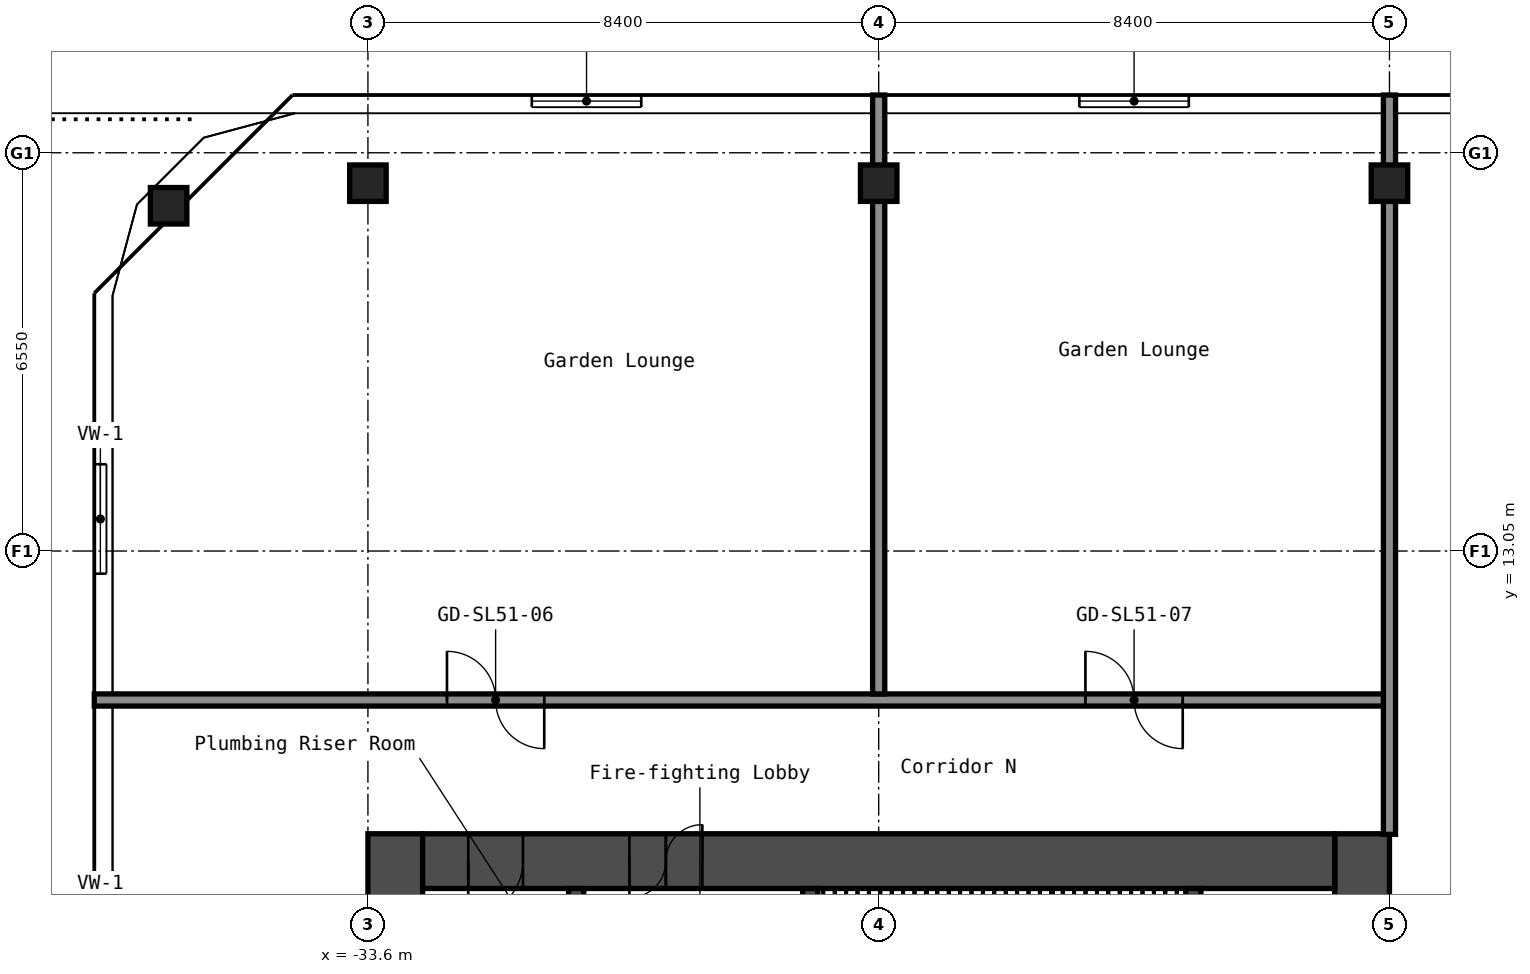
"""IFC4 building model, lengths in metres.
Left out: names, types, materials, properties, quantities, classifications, styles, units other than length and angle.
Written with IfcOpenShell. Run it as: python <this file> out.ifc"""

import sys

from ifc_helpers import new_model, si_unit, direction, frame, frame_2d, origin, origin_2d, place, context, subcontext, project, spatial, rectangle, hollow_rectangle, extrude, element, fill, save


model = new_model("IFC4")
c1 = context("Model", 3, precision=1e-05, world=origin(), true_north=direction((0.0, 1.0)))
c2 = subcontext(c1, "Body", "Model", "MODEL_VIEW")
j1 = project(units=[si_unit("LENGTHUNIT", "METRE"), si_unit("PLANEANGLEUNIT", "RADIAN")], contexts=[c1])
p1 = place(None, origin())
s1 = spatial("IfcSite", under=j1, at=p1, CompositionType="ELEMENT")
p2 = place(p1, origin())
s2 = spatial("IfcBuilding", under=s1, at=p2, CompositionType="ELEMENT")
p3 = place(p2, frame((0.0, 0.0, 180.2)))
s3 = spatial("IfcBuildingStorey", under=s2, at=p3, CompositionType="ELEMENT", Elevation=180.2)
for number, where, z_axis, x_axis in (
    (1, (-36.878, 18.729, 0.0), (0.0, 0.0, 1.0), (1.0, 0.0, 0.0)),
    (2, (-33.6, 19.1, 0.0), (0.0, 0.0, 1.0), (1.0, 0.0, 0.0)),
    (3, (-25.2, 19.1, 0.0), (0.0, 0.0, 1.0), (1.0, 0.0, 0.0)),
    (4, (-16.8, 19.1, 0.0), (0.0, 0.0, 1.0), (1.0, 0.0, 0.0)),
):
    element("IfcColumn", number, at=place(p3, frame(where, z_axis=z_axis, x_axis=x_axis)), inside=s3, PredefinedType="COLUMN", context=c2, shape_type="SweptSolid", body=[
        extrude(hollow_rectangle(XDim=0.6, YDim=0.6, WallThickness=0.025, InnerFilletRadius=0.038, OuterFilletRadius=0.062, at=origin_2d()), origin(), (0.0, 0.0, 1.0), 5.95),
    ])
p4 = place(p3, frame((-17.25, -8.4, 0.0), z_axis=(0.0, 0.0, 1.0), x_axis=(0.0, 1.0, 0.0)))
e5 = element("IfcWall", 5, at=p4, inside=s3, PredefinedType="SHEAR", context=c2, shape_type="SweptSolid", body=[
    extrude(rectangle(XDim=16.8, YDim=0.9, at=frame_2d((8.4, 0.0))), origin(), (0.0, 0.0, 1.0), 5.95),
])
p5 = place(p4, frame((10.1, 0.0, 0.0)))
e6 = element("IfcOpeningElement", 6, at=p5, cuts=e5, PredefinedType="OPENING", context=c2, shape_type="SweptSolid", body=[
    extrude(rectangle(XDim=1.6, YDim=2.1, at=frame_2d((0.8, 1.05))), frame((0.0, 0.46, 0.0), z_axis=(0.0, -1.0, 0.0), x_axis=(1.0, 0.0, 0.0)), (0.0, 0.0, 1.0), 0.92),
])
p6 = place(p3, frame((-33.15, -8.4, 0.0), z_axis=(0.0, 0.0, 1.0), x_axis=(0.0, 1.0, 0.0)))
e7 = element("IfcWall", 7, at=p6, inside=s3, PredefinedType="SHEAR", context=c2, shape_type="SweptSolid", body=[
    extrude(rectangle(XDim=16.8, YDim=0.9, at=frame_2d((8.4, 0.0))), origin(), (0.0, 0.0, 1.0), 5.95),
])
p7 = place(p3, frame((-32.7, 7.95, 0.0), z_axis=(0.0, 0.0, 1.0), x_axis=(1.0, 0.0, 0.0)))
e8 = element("IfcWall", 8, at=p7, inside=s3, PredefinedType="SHEAR", context=c2, shape_type="SweptSolid", body=[
    extrude(rectangle(XDim=15.0, YDim=0.9, at=frame_2d((7.5, 0.0))), origin(), (0.0, 0.0, 1.0), 5.95),
])
p8 = place(p7, frame((3.4, 0.0, 0.0)))
e9 = element("IfcOpeningElement", 9, at=p8, cuts=e8, PredefinedType="OPENING", context=c2, shape_type="SweptSolid", body=[
    extrude(rectangle(XDim=1.2, YDim=2.1, at=frame_2d((0.6, 1.05))), frame((0.0, 0.46, 0.0), z_axis=(0.0, -1.0, 0.0), x_axis=(1.0, 0.0, 0.0)), (0.0, 0.0, 1.0), 0.92),
])
p9 = place(p7, frame((0.75, 0.0, 0.0)))
e10 = element("IfcOpeningElement", 10, at=p9, cuts=e8, PredefinedType="OPENING", context=c2, shape_type="SweptSolid", body=[
    extrude(rectangle(XDim=0.9, YDim=2.1, at=frame_2d((0.45, 1.05))), frame((0.0, 0.46, 0.0), z_axis=(0.0, -1.0, 0.0), x_axis=(1.0, 0.0, 0.0)), (0.0, 0.0, 1.0), 0.92),
])
p10 = place(p3, frame((-20.025, 1.2, 0.0), z_axis=(0.0, 0.0, 1.0), x_axis=(0.0, 1.0, 0.0)))
e11 = element("IfcWall", 11, at=p10, inside=s3, PredefinedType="SHEAR", context=c2, shape_type="SweptSolid", body=[
    extrude(rectangle(XDim=6.3, YDim=0.25, at=frame_2d((3.15, 0.0))), origin(), (0.0, 0.0, 1.0), 5.95),
])
p11 = place(p3, frame((-26.325, 3.75, 0.0), z_axis=(0.0, 0.0, 1.0), x_axis=(0.0, 1.0, 0.0)))
e12 = element("IfcWall", 12, at=p11, inside=s3, PredefinedType="SHEAR", context=c2, shape_type="SweptSolid", body=[
    extrude(rectangle(XDim=3.75, YDim=0.25, at=frame_2d((1.875, 0.0))), origin(), (0.0, 0.0, 1.0), 5.95),
])
p12 = place(p11, frame((1.25, 0.0, 0.0)))
e13 = element("IfcOpeningElement", 13, at=p12, cuts=e12, PredefinedType="OPENING", context=c2, shape_type="SweptSolid", body=[
    extrude(rectangle(XDim=1.2, YDim=2.1, at=frame_2d((0.6, 1.05))), frame((0.0, 0.135, 0.0), z_axis=(0.0, -1.0, 0.0), x_axis=(1.0, 0.0, 0.0)), (0.0, 0.0, 1.0), 0.27),
])
p13 = place(p3, frame((-30.175, 1.45, 0.0), z_axis=(0.0, 0.0, 1.0), x_axis=(0.0, 1.0, 0.0)))
e14 = element("IfcWall", 14, at=p13, inside=s3, PredefinedType="SHEAR", context=c2, shape_type="SweptSolid", body=[
    extrude(rectangle(XDim=6.05, YDim=0.25, at=frame_2d((3.025, 0.0))), origin(), (0.0, 0.0, 1.0), 5.95),
])
p14 = place(p13, frame((2.625, 0.0, 0.0)))
e15 = element("IfcOpeningElement", 15, at=p14, cuts=e14, PredefinedType="OPENING", context=c2, shape_type="SweptSolid", body=[
    extrude(rectangle(XDim=1.1, YDim=2.1, at=frame_2d((0.55, 1.05))), frame((0.0, 0.135, 0.0), z_axis=(0.0, -1.0, 0.0), x_axis=(1.0, 0.0, 0.0)), (0.0, 0.0, 1.0), 0.27),
])
p15 = place(p3, frame((-38.1, 10.6, 0.0), z_axis=(0.0, 0.0, 1.0), x_axis=(1.0, 0.0, 0.0)))
e16 = element("IfcWall", 16, at=p15, inside=s3, PredefinedType="PARTITIONING", context=c2, shape_type="SweptSolid", body=[
    extrude(rectangle(XDim=21.3, YDim=0.2, at=frame_2d((10.65, 0.0))), origin(), (0.0, 0.0, 1.0), 5.95),
])
p16 = place(p15, frame((5.8, 0.0, 0.0)))
e17 = element("IfcOpeningElement", 17, at=p16, cuts=e16, PredefinedType="OPENING", context=c2, shape_type="SweptSolid", body=[
    extrude(rectangle(XDim=1.6, YDim=2.1, at=frame_2d((0.8, 1.05))), frame((0.0, 0.11, 0.0), z_axis=(0.0, -1.0, 0.0), x_axis=(1.0, 0.0, 0.0)), (0.0, 0.0, 1.0), 0.22),
])
p17 = place(p15, frame((16.3, 0.0, 0.0)))
e18 = element("IfcOpeningElement", 18, at=p17, cuts=e16, PredefinedType="OPENING", context=c2, shape_type="SweptSolid", body=[
    extrude(rectangle(XDim=1.6, YDim=2.1, at=frame_2d((0.8, 1.05))), frame((0.0, 0.11, 0.0), z_axis=(0.0, -1.0, 0.0), x_axis=(1.0, 0.0, 0.0)), (0.0, 0.0, 1.0), 0.22),
])
p18 = place(p3, frame((-25.2, 10.7, 0.0), z_axis=(0.0, 0.0, 1.0), x_axis=(0.0, 1.0, 0.0)))
e19 = element("IfcWall", 19, at=p18, inside=s3, PredefinedType="PARTITIONING", context=c2, shape_type="SweptSolid", body=[
    extrude(rectangle(XDim=9.85, YDim=0.2, at=frame_2d((4.925, 0.0))), origin(), (0.0, 0.0, 1.0), 5.95),
])
p19 = place(p3, frame((-16.8, 8.39, 0.0), z_axis=(0.0, 0.0, 1.0), x_axis=(0.0, 1.0, 0.0)))
e20 = element("IfcWall", 20, at=p19, inside=s3, PredefinedType="PARTITIONING", context=c2, shape_type="SweptSolid", body=[
    extrude(rectangle(XDim=12.16, YDim=0.2, at=frame_2d((6.08, 0.0))), origin(), (0.0, 0.0, 1.0), 5.95),
])
p20 = place(p3, frame((-16.8, 20.45, 4.45), z_axis=(0.0, 0.0, 1.0), x_axis=(-1.0, 0.0, 0.0)))
p21 = place(p20, frame((3.3, 0.0, 0.25)))
p22 = place(p21, origin())
e21 = element("IfcWindow", 21, at=p22, inside=s3, PartitioningType="SINGLE_PANEL", PredefinedType="WINDOW", context=c2, shape_type="SweptSolid", body=[
    extrude(rectangle(XDim=1.8, YDim=0.9, at=frame_2d((0.9, 0.45))), frame((0.0, 0.03, 0.0), z_axis=(0.0, -1.0, 0.0), x_axis=(1.0, 0.0, 0.0)), (0.0, 0.0, 1.0), 0.06),
])
p23 = place(p3, frame((-25.2, 20.45, 4.45), z_axis=(0.0, 0.0, 1.0), x_axis=(-1.0, 0.0, 0.0)))
p24 = place(p23, frame((3.905, 0.0, 0.25)))
p25 = place(p24, origin())
e22 = element("IfcWindow", 22, at=p25, inside=s3, PartitioningType="SINGLE_PANEL", PredefinedType="WINDOW", context=c2, shape_type="SweptSolid", body=[
    extrude(rectangle(XDim=1.8, YDim=0.9, at=frame_2d((0.9, 0.45))), frame((0.0, 0.03, 0.0), z_axis=(0.0, -1.0, 0.0), x_axis=(1.0, 0.0, 0.0)), (0.0, 0.0, 1.0), 0.06),
])
p26 = place(p3, frame((-38.0, 17.26, 4.45), z_axis=(0.0, 0.0, 1.0), x_axis=(0.0, -1.0, 0.0)))
p27 = place(p26, frame((2.782, 0.0, 0.25)))
p28 = place(p27, origin())
e23 = element("IfcWindow", 23, at=p28, inside=s3, PartitioningType="SINGLE_PANEL", PredefinedType="WINDOW", context=c2, shape_type="SweptSolid", body=[
    extrude(rectangle(XDim=1.8, YDim=0.9, at=frame_2d((0.9, 0.45))), frame((0.0, 0.03, 0.0), z_axis=(0.0, -1.0, 0.0), x_axis=(1.0, 0.0, 0.0)), (0.0, 0.0, 1.0), 0.06),
])
p29 = place(p8, origin())
e24 = element("IfcDoor", 24, at=p29, inside=s3, OperationType="DOUBLE_DOOR_SINGLE_SWING", PredefinedType="DOOR", context=c2, shape_type="SweptSolid", body=[
    extrude(rectangle(XDim=1.2, YDim=2.1, at=frame_2d((0.6, 1.05))), frame((0.0, 0.025, 0.0), z_axis=(0.0, -1.0, 0.0), x_axis=(1.0, 0.0, 0.0)), (0.0, 0.0, 1.0), 0.05),
])
fill(e9, e24)
p30 = place(p9, origin())
e25 = element("IfcDoor", 25, at=p30, inside=s3, OperationType="SINGLE_SWING_LEFT", PredefinedType="DOOR", context=c2, shape_type="SweptSolid", body=[
    extrude(rectangle(XDim=0.9, YDim=2.1, at=frame_2d((0.45, 1.05))), frame((0.0, 0.025, 0.0), z_axis=(0.0, -1.0, 0.0), x_axis=(1.0, 0.0, 0.0)), (0.0, 0.0, 1.0), 0.05),
])
fill(e10, e25)
p31 = place(p16, origin())
e26 = element("IfcDoor", 26, at=p31, inside=s3, OperationType="DOUBLE_DOOR_SINGLE_SWING", PredefinedType="DOOR", context=c2, shape_type="SweptSolid", body=[
    extrude(rectangle(XDim=1.6, YDim=2.1, at=frame_2d((0.8, 1.05))), frame((0.0, 0.025, 0.0), z_axis=(0.0, -1.0, 0.0), x_axis=(1.0, 0.0, 0.0)), (0.0, 0.0, 1.0), 0.05),
])
fill(e17, e26)
p32 = place(p17, origin())
e27 = element("IfcDoor", 27, at=p32, inside=s3, OperationType="DOUBLE_DOOR_SINGLE_SWING", PredefinedType="DOOR", context=c2, shape_type="SweptSolid", body=[
    extrude(rectangle(XDim=1.6, YDim=2.1, at=frame_2d((0.8, 1.05))), frame((0.0, 0.025, 0.0), z_axis=(0.0, -1.0, 0.0), x_axis=(1.0, 0.0, 0.0)), (0.0, 0.0, 1.0), 0.05),
])
fill(e18, e27)
save(model, sys.argv[1])
